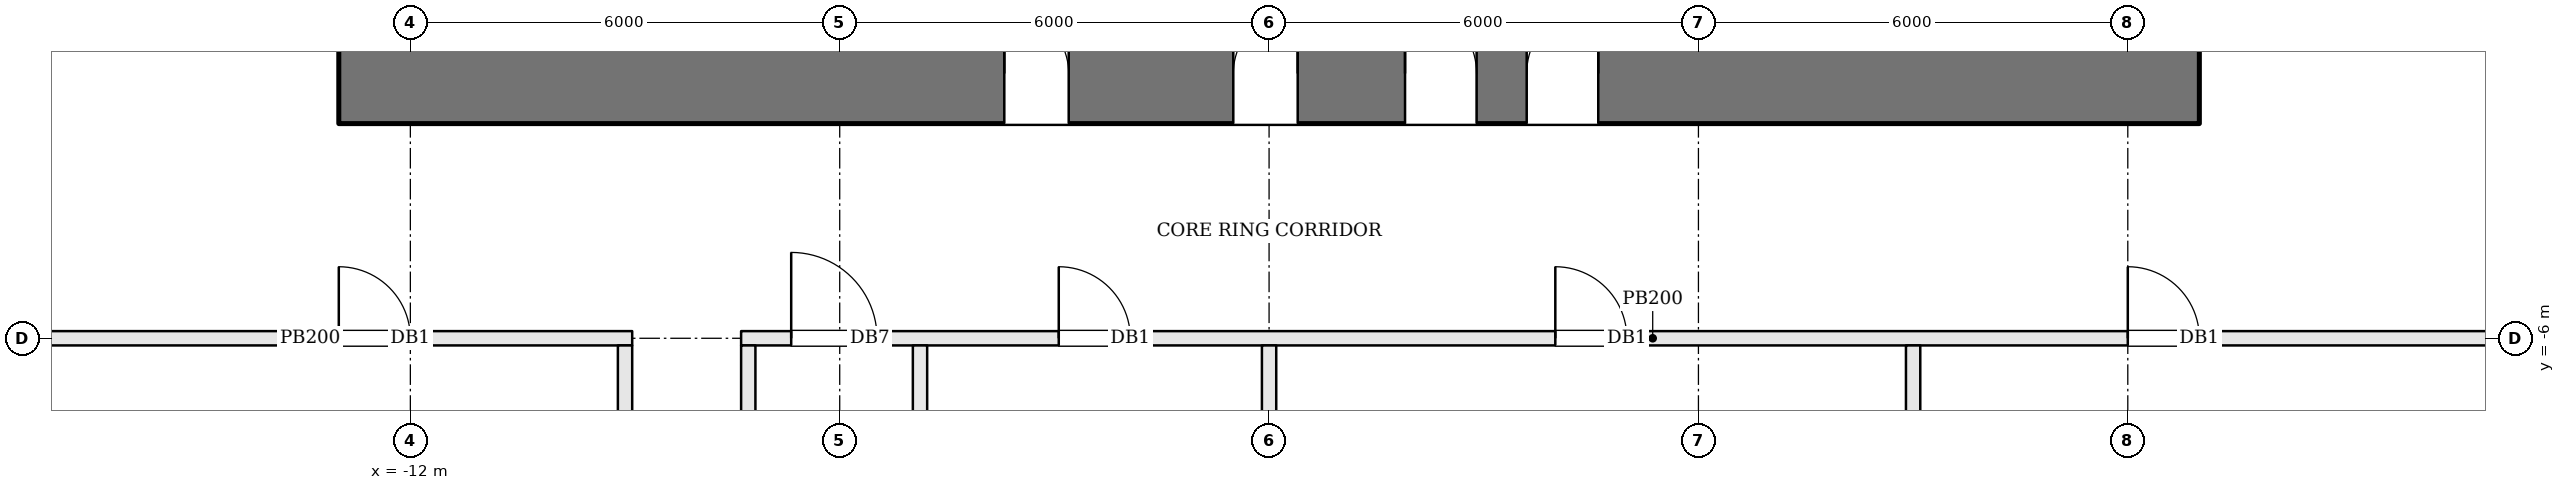
"""IFC4 building model, lengths in metres.
Left out: names, types, materials, properties, quantities, classifications, styles, units other than length and angle.
Written with IfcOpenShell. Run it as: python <this file> out.ifc"""

import sys

from ifc_helpers import new_model, si_unit, direction, frame, frame_2d, origin, place, context, subcontext, project, spatial, rectangle, extrude, element, fill, save


model = new_model("IFC4")
c1 = context("Model", 3, precision=1e-05, world=origin(), true_north=direction((0.0, 1.0)))
c2 = subcontext(c1, "Body", "Model", "MODEL_VIEW")
j1 = project(units=[si_unit("LENGTHUNIT", "METRE"), si_unit("PLANEANGLEUNIT", "RADIAN")], contexts=[c1])
p1 = place(None, origin())
s1 = spatial("IfcSite", under=j1, at=p1, CompositionType="ELEMENT")
p2 = place(p1, origin())
s2 = spatial("IfcBuilding", under=s1, at=p2, CompositionType="ELEMENT")
p3 = place(p2, frame((0.0, 0.0, 22.8)))
s3 = spatial("IfcBuildingStorey", under=s2, at=p3, CompositionType="ELEMENT", Elevation=22.8)
p4 = place(p3, frame((-13.0, -2.3, 0.0), z_axis=(0.0, 0.0, 1.0), x_axis=(1.0, 0.0, 0.0)))
e1 = element("IfcWall", 1, at=p4, inside=s3, PredefinedType="SHEAR", context=c2, shape_type="SweptSolid", body=[
    extrude(rectangle(XDim=26.0, YDim=1.4, at=frame_2d((13.0, 0.0))), origin(), (0.0, 0.0, 1.0), 5.4),
])
p5 = place(p4, frame((9.3, 0.0, 0.0)))
e2 = element("IfcOpeningElement", 2, at=p5, cuts=e1, PredefinedType="OPENING", context=c2, shape_type="SweptSolid", body=[
    extrude(rectangle(XDim=0.9, YDim=2.1, at=frame_2d((0.45, 1.05))), frame((0.0, 0.71, 0.0), z_axis=(0.0, -1.0, 0.0), x_axis=(1.0, 0.0, 0.0)), (0.0, 0.0, 1.0), 1.42),
])
p6 = place(p4, frame((12.5, 0.0, 0.0)))
e3 = element("IfcOpeningElement", 3, at=p6, cuts=e1, PredefinedType="OPENING", context=c2, shape_type="SweptSolid", body=[
    extrude(rectangle(XDim=0.9, YDim=2.1, at=frame_2d((0.45, 1.05))), frame((0.0, 0.71, 0.0), z_axis=(0.0, -1.0, 0.0), x_axis=(1.0, 0.0, 0.0)), (0.0, 0.0, 1.0), 1.42),
])
p7 = place(p4, frame((14.9, 0.0, 0.0)))
e4 = element("IfcOpeningElement", 4, at=p7, cuts=e1, PredefinedType="OPENING", context=c2, shape_type="SweptSolid", body=[
    extrude(rectangle(XDim=1.0, YDim=2.1, at=frame_2d((0.5, 1.05))), frame((0.0, 0.71, 0.0), z_axis=(0.0, -1.0, 0.0), x_axis=(1.0, 0.0, 0.0)), (0.0, 0.0, 1.0), 1.42),
])
p8 = place(p4, frame((16.6, 0.0, 0.0)))
e5 = element("IfcOpeningElement", 5, at=p8, cuts=e1, PredefinedType="OPENING", context=c2, shape_type="SweptSolid", body=[
    extrude(rectangle(XDim=1.0, YDim=2.1, at=frame_2d((0.5, 1.05))), frame((0.0, 0.71, 0.0), z_axis=(0.0, -1.0, 0.0), x_axis=(1.0, 0.0, 0.0)), (0.0, 0.0, 1.0), 1.42),
])
p9 = place(p3, frame((-7.378, -6.0, 0.0), z_axis=(0.0, 0.0, 1.0), x_axis=(1.0, 0.0, 0.0)))
e6 = element("IfcWall", 6, at=p9, inside=s3, PredefinedType="PARTITIONING", context=c2, shape_type="SweptSolid", body=[
    extrude(rectangle(XDim=25.478, YDim=0.2, at=frame_2d((12.739, 0.0))), origin(), (0.0, 0.0, 1.0), 4.43),
])
p10 = place(p9, frame((0.7, 0.0, 0.0)))
e7 = element("IfcOpeningElement", 7, at=p10, cuts=e6, PredefinedType="OPENING", context=c2, shape_type="SweptSolid", body=[
    extrude(rectangle(XDim=1.2, YDim=2.1, at=frame_2d((0.6, 1.05))), frame((0.0, 0.11, 0.0), z_axis=(0.0, -1.0, 0.0), x_axis=(1.0, 0.0, 0.0)), (0.0, 0.0, 1.0), 0.22),
])
p11 = place(p9, frame((4.439, 0.0, 0.0)))
e8 = element("IfcOpeningElement", 8, at=p11, cuts=e6, PredefinedType="OPENING", context=c2, shape_type="SweptSolid", body=[
    extrude(rectangle(XDim=1.0, YDim=2.1, at=frame_2d((0.5, 1.05))), frame((0.0, 0.11, 0.0), z_axis=(0.0, -1.0, 0.0), x_axis=(1.0, 0.0, 0.0)), (0.0, 0.0, 1.0), 0.22),
])
p12 = place(p9, frame((11.378, 0.0, 0.0)))
e9 = element("IfcOpeningElement", 9, at=p12, cuts=e6, PredefinedType="OPENING", context=c2, shape_type="SweptSolid", body=[
    extrude(rectangle(XDim=1.0, YDim=2.1, at=frame_2d((0.5, 1.05))), frame((0.0, 0.11, 0.0), z_axis=(0.0, -1.0, 0.0), x_axis=(1.0, 0.0, 0.0)), (0.0, 0.0, 1.0), 0.22),
])
p13 = place(p9, frame((19.378, 0.0, 0.0)))
e10 = element("IfcOpeningElement", 10, at=p13, cuts=e6, PredefinedType="OPENING", context=c2, shape_type="SweptSolid", body=[
    extrude(rectangle(XDim=1.0, YDim=2.1, at=frame_2d((0.5, 1.05))), frame((0.0, 0.11, 0.0), z_axis=(0.0, -1.0, 0.0), x_axis=(1.0, 0.0, 0.0)), (0.0, 0.0, 1.0), 0.22),
])
p14 = place(p3, frame((-4.878, -6.1, 0.0), z_axis=(0.0, 0.0, 1.0), x_axis=(0.0, -1.0, 0.0)))
e11 = element("IfcWall", 11, at=p14, inside=s3, PredefinedType="PARTITIONING", context=c2, shape_type="SweptSolid", body=[
    extrude(rectangle(XDim=13.331, YDim=0.2, at=frame_2d((6.666, 0.0))), origin(), (0.0, 0.0, 1.0), 4.43),
])
p15 = place(p3, frame((-7.278, -19.231, 0.0), z_axis=(0.0, 0.0, 1.0), x_axis=(0.0, 1.0, 0.0)))
e12 = element("IfcWall", 12, at=p15, inside=s3, PredefinedType="PARTITIONING", context=c2, shape_type="SweptSolid", body=[
    extrude(rectangle(XDim=13.131, YDim=0.2, at=frame_2d((6.565, 0.0))), origin(), (0.0, 0.0, 1.0), 4.43),
])
p16 = place(p3, frame((-17.9, -6.0, 0.0), z_axis=(0.0, 0.0, 1.0), x_axis=(1.0, 0.0, 0.0)))
e13 = element("IfcWall", 13, at=p16, inside=s3, PredefinedType="PARTITIONING", context=c2, shape_type="SweptSolid", body=[
    extrude(rectangle(XDim=9.0, YDim=0.2, at=frame_2d((4.5, 0.0))), origin(), (0.0, 0.0, 1.0), 4.43),
])
p17 = place(p16, frame((4.9, 0.0, 0.0)))
e14 = element("IfcOpeningElement", 14, at=p17, cuts=e13, PredefinedType="OPENING", context=c2, shape_type="SweptSolid", body=[
    extrude(rectangle(XDim=1.0, YDim=2.1, at=frame_2d((0.5, 1.05))), frame((0.0, 0.11, 0.0), z_axis=(0.0, -1.0, 0.0), x_axis=(1.0, 0.0, 0.0)), (0.0, 0.0, 1.0), 0.22),
])
p18 = place(p3, frame((-9.0, -6.1, 0.0), z_axis=(0.0, 0.0, 1.0), x_axis=(0.0, -1.0, 0.0)))
e15 = element("IfcWall", 15, at=p18, inside=s3, PredefinedType="PARTITIONING", context=c2, shape_type="SweptSolid", body=[
    extrude(rectangle(XDim=11.978, YDim=0.2, at=frame_2d((5.989, 0.0))), origin(), (0.0, 0.0, 1.0), 4.43),
])
p19 = place(p3, frame((0.0, -6.1, 0.0), z_axis=(0.0, 0.0, 1.0), x_axis=(0.0, -1.0, 0.0)))
e16 = element("IfcWall", 16, at=p19, inside=s3, PredefinedType="PARTITIONING", context=c2, shape_type="SweptSolid", body=[
    extrude(rectangle(XDim=12.641, YDim=0.2, at=frame_2d((6.32, 0.0))), origin(), (0.0, 0.0, 1.0), 4.43),
])
p20 = place(p3, frame((9.0, -6.1, 0.0), z_axis=(0.0, 0.0, 1.0), x_axis=(0.0, -1.0, 0.0)))
e17 = element("IfcWall", 17, at=p20, inside=s3, PredefinedType="PARTITIONING", context=c2, shape_type="SweptSolid", body=[
    extrude(rectangle(XDim=11.946, YDim=0.2, at=frame_2d((5.973, 0.0))), origin(), (0.0, 0.0, 1.0), 4.43),
])
p21 = place(p5, origin())
e18 = element("IfcDoor", 18, at=p21, inside=s3, OperationType="SINGLE_SWING_LEFT", PredefinedType="DOOR", context=c2, shape_type="SweptSolid", body=[
    extrude(rectangle(XDim=0.9, YDim=2.1, at=frame_2d((0.45, 1.05))), frame((0.0, 0.025, 0.0), z_axis=(0.0, -1.0, 0.0), x_axis=(1.0, 0.0, 0.0)), (0.0, 0.0, 1.0), 0.05),
])
fill(e2, e18)
p22 = place(p6, origin())
e19 = element("IfcDoor", 19, at=p22, inside=s3, OperationType="SINGLE_SWING_RIGHT", PredefinedType="DOOR", context=c2, shape_type="SweptSolid", body=[
    extrude(rectangle(XDim=0.9, YDim=2.1, at=frame_2d((0.45, 1.05))), frame((0.0, 0.025, 0.0), z_axis=(0.0, -1.0, 0.0), x_axis=(1.0, 0.0, 0.0)), (0.0, 0.0, 1.0), 0.05),
])
fill(e3, e19)
p23 = place(p7, origin())
e20 = element("IfcDoor", 20, at=p23, inside=s3, OperationType="SINGLE_SWING_LEFT", PredefinedType="DOOR", context=c2, shape_type="SweptSolid", body=[
    extrude(rectangle(XDim=1.0, YDim=2.1, at=frame_2d((0.5, 1.05))), frame((0.0, 0.025, 0.0), z_axis=(0.0, -1.0, 0.0), x_axis=(1.0, 0.0, 0.0)), (0.0, 0.0, 1.0), 0.05),
])
fill(e4, e20)
p24 = place(p8, origin())
e21 = element("IfcDoor", 21, at=p24, inside=s3, OperationType="SINGLE_SWING_RIGHT", PredefinedType="DOOR", context=c2, shape_type="SweptSolid", body=[
    extrude(rectangle(XDim=1.0, YDim=2.1, at=frame_2d((0.5, 1.05))), frame((0.0, 0.025, 0.0), z_axis=(0.0, -1.0, 0.0), x_axis=(1.0, 0.0, 0.0)), (0.0, 0.0, 1.0), 0.05),
])
fill(e5, e21)
p25 = place(p10, origin())
e22 = element("IfcDoor", 22, at=p25, inside=s3, OperationType="SINGLE_SWING_LEFT", PredefinedType="DOOR", context=c2, shape_type="SweptSolid", body=[
    extrude(rectangle(XDim=1.2, YDim=2.1, at=frame_2d((0.6, 1.05))), frame((0.0, 0.025, 0.0), z_axis=(0.0, -1.0, 0.0), x_axis=(1.0, 0.0, 0.0)), (0.0, 0.0, 1.0), 0.05),
])
fill(e7, e22)
p26 = place(p17, origin())
e23 = element("IfcDoor", 23, at=p26, inside=s3, OperationType="SINGLE_SWING_LEFT", PredefinedType="DOOR", context=c2, shape_type="SweptSolid", body=[
    extrude(rectangle(XDim=1.0, YDim=2.1, at=frame_2d((0.5, 1.05))), frame((0.0, 0.025, 0.0), z_axis=(0.0, -1.0, 0.0), x_axis=(1.0, 0.0, 0.0)), (0.0, 0.0, 1.0), 0.05),
])
fill(e14, e23)
p27 = place(p11, origin())
e24 = element("IfcDoor", 24, at=p27, inside=s3, OperationType="SINGLE_SWING_LEFT", PredefinedType="DOOR", context=c2, shape_type="SweptSolid", body=[
    extrude(rectangle(XDim=1.0, YDim=2.1, at=frame_2d((0.5, 1.05))), frame((0.0, 0.025, 0.0), z_axis=(0.0, -1.0, 0.0), x_axis=(1.0, 0.0, 0.0)), (0.0, 0.0, 1.0), 0.05),
])
fill(e8, e24)
p28 = place(p12, origin())
e25 = element("IfcDoor", 25, at=p28, inside=s3, OperationType="SINGLE_SWING_LEFT", PredefinedType="DOOR", context=c2, shape_type="SweptSolid", body=[
    extrude(rectangle(XDim=1.0, YDim=2.1, at=frame_2d((0.5, 1.05))), frame((0.0, 0.025, 0.0), z_axis=(0.0, -1.0, 0.0), x_axis=(1.0, 0.0, 0.0)), (0.0, 0.0, 1.0), 0.05),
])
fill(e9, e25)
p29 = place(p13, origin())
e26 = element("IfcDoor", 26, at=p29, inside=s3, OperationType="SINGLE_SWING_LEFT", PredefinedType="DOOR", context=c2, shape_type="SweptSolid", body=[
    extrude(rectangle(XDim=1.0, YDim=2.1, at=frame_2d((0.5, 1.05))), frame((0.0, 0.025, 0.0), z_axis=(0.0, -1.0, 0.0), x_axis=(1.0, 0.0, 0.0)), (0.0, 0.0, 1.0), 0.05),
])
fill(e10, e26)
save(model, sys.argv[1])
